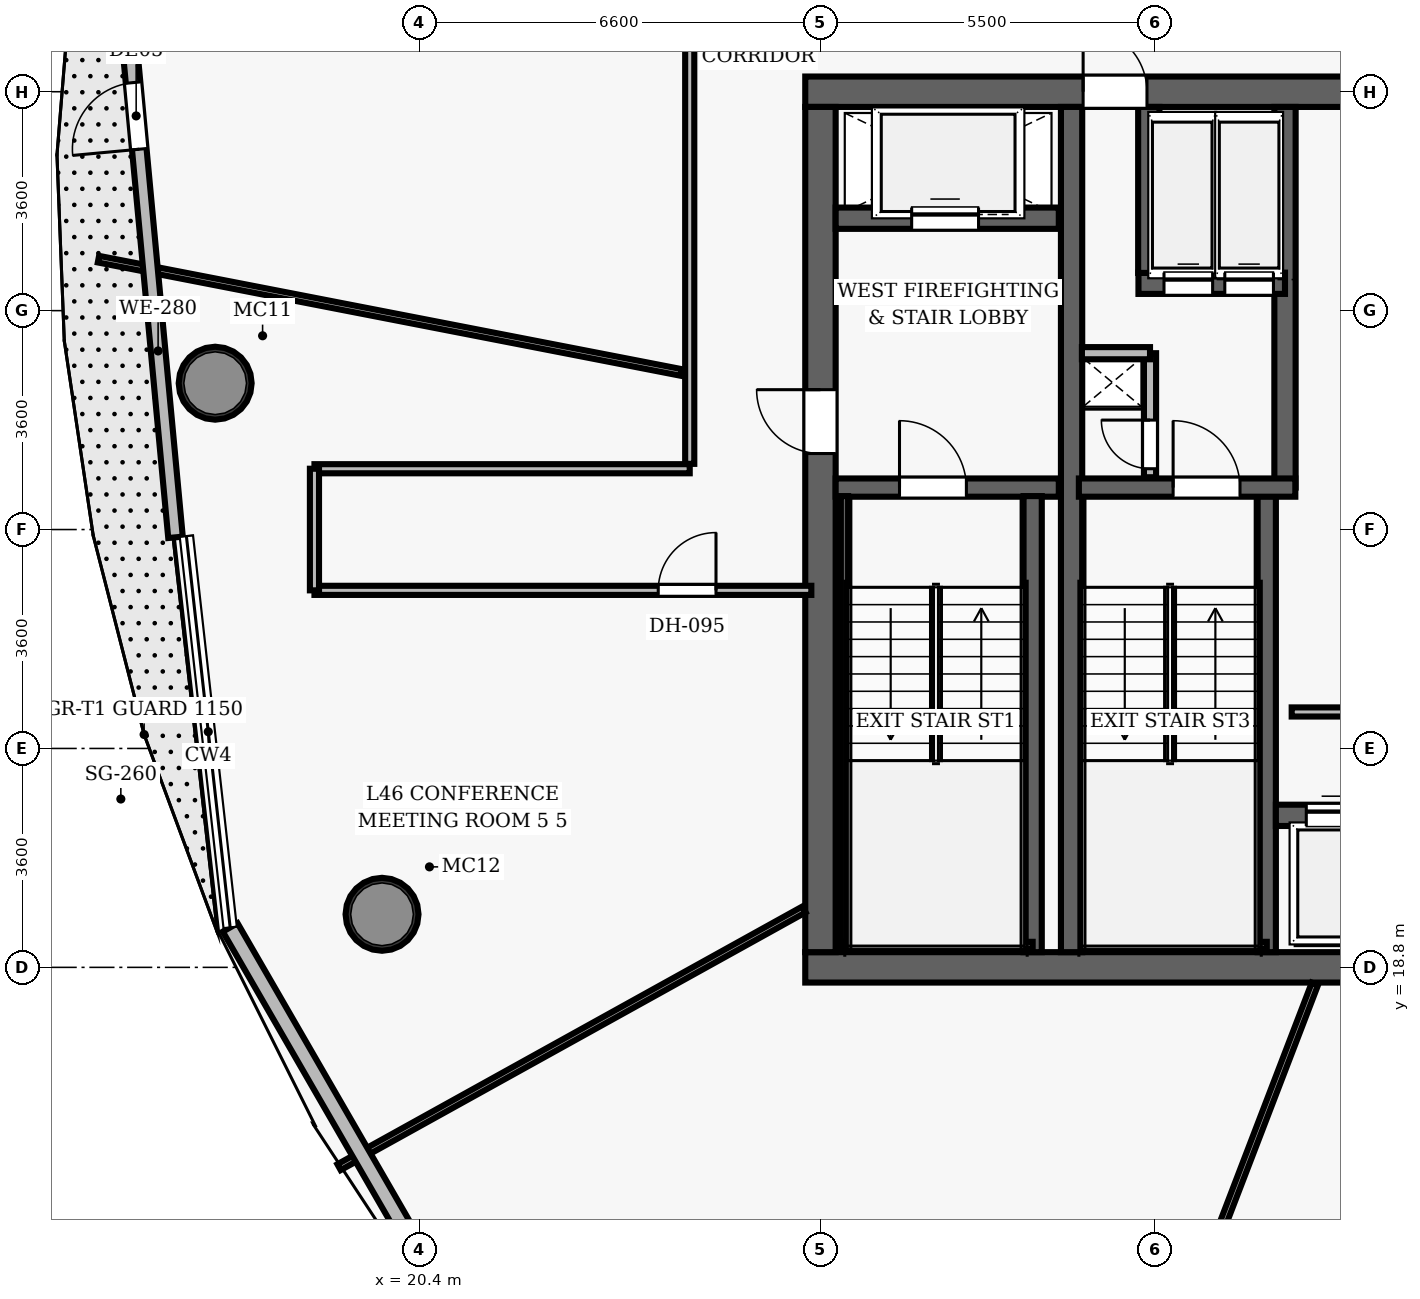
"""IFC4 building model, lengths in metres.
Left out: names, types, materials, properties, quantities, classifications, styles, units other than length and angle.
Written with IfcOpenShell. Run it as: python <this file> out.ifc"""

import sys

from ifc_helpers import new_model, si_unit, direction, frame, frame_2d, origin, origin_2d, place, context, subcontext, project, spatial, rectangle, hollow_circle, extrude, element, fill, save


model = new_model("IFC4")
c1 = context("Model", 3, precision=1e-05, world=origin(), true_north=direction((0.0, 1.0)))
c2 = subcontext(c1, "Body", "Model", "MODEL_VIEW")
j1 = project(units=[si_unit("LENGTHUNIT", "METRE"), si_unit("PLANEANGLEUNIT", "RADIAN")], contexts=[c1])
p1 = place(None, origin())
s1 = spatial("IfcSite", under=j1, at=p1, CompositionType="ELEMENT")
p2 = place(p1, origin())
s2 = spatial("IfcBuilding", under=s1, at=p2, CompositionType="ELEMENT")
p3 = place(p2, frame((0.0, 0.0, 182.75)))
s3 = spatial("IfcBuildingStorey", under=s2, at=p3, CompositionType="ELEMENT", Elevation=182.75)
p4 = place(p3, frame((26.75, 18.8, 0.0), z_axis=(0.0, 0.0, 1.0), x_axis=(1.0, 0.0, 0.0)))
e1 = element("IfcWall", 1, at=p4, inside=s3, PredefinedType="SHEAR", context=c2, shape_type="SweptSolid", body=[
    extrude(rectangle(XDim=22.5, YDim=0.5, at=frame_2d((11.25, 0.0))), origin(), (0.0, 0.0, 1.0), 3.85),
])
p5 = place(p4, frame((14.47, 0.0, 0.0)))
e2 = element("IfcOpeningElement", 2, at=p5, cuts=e1, PredefinedType="OPENING", context=c2, shape_type="SweptSolid", body=[
    extrude(rectangle(XDim=1.05, YDim=2.15, at=frame_2d((0.525, 1.075))), frame((0.0, 0.26, 0.0), z_axis=(0.0, -1.0, 0.0), x_axis=(1.0, 0.0, 0.0)), (0.0, 0.0, 1.0), 0.52),
])
p6 = place(p3, frame((26.75, 33.2, 0.0), z_axis=(0.0, 0.0, 1.0), x_axis=(1.0, 0.0, 0.0)))
e3 = element("IfcWall", 3, at=p6, inside=s3, PredefinedType="SHEAR", context=c2, shape_type="SweptSolid", body=[
    extrude(rectangle(XDim=22.5, YDim=0.5, at=frame_2d((11.25, 0.0))), origin(), (0.0, 0.0, 1.0), 3.85),
])
p7 = place(p6, frame((4.57, 0.0, 0.0)))
e4 = element("IfcOpeningElement", 4, at=p7, cuts=e3, PredefinedType="OPENING", context=c2, shape_type="SweptSolid", body=[
    extrude(rectangle(XDim=1.05, YDim=2.15, at=frame_2d((0.525, 1.075))), frame((0.0, 0.26, 0.0), z_axis=(0.0, -1.0, 0.0), x_axis=(1.0, 0.0, 0.0)), (0.0, 0.0, 1.0), 0.52),
])
p8 = place(p6, frame((14.47, 0.0, 0.0)))
e5 = element("IfcOpeningElement", 5, at=p8, cuts=e3, PredefinedType="OPENING", context=c2, shape_type="SweptSolid", body=[
    extrude(rectangle(XDim=1.05, YDim=2.15, at=frame_2d((0.525, 1.075))), frame((0.0, 0.26, 0.0), z_axis=(0.0, -1.0, 0.0), x_axis=(1.0, 0.0, 0.0)), (0.0, 0.0, 1.0), 0.52),
])
p9 = place(p3, frame((27.0, 19.05, 0.0), z_axis=(0.0, 0.0, 1.0), x_axis=(0.0, 1.0, 0.0)))
e6 = element("IfcWall", 6, at=p9, inside=s3, PredefinedType="SHEAR", context=c2, shape_type="SweptSolid", body=[
    extrude(rectangle(XDim=13.9, YDim=0.5, at=frame_2d((6.95, 0.0))), origin(), (0.0, 0.0, 1.0), 3.85),
])
p10 = place(p9, frame((8.2, 0.0, 0.0)))
e7 = element("IfcOpeningElement", 7, at=p10, cuts=e6, PredefinedType="OPENING", context=c2, shape_type="SweptSolid", body=[
    extrude(rectangle(XDim=1.05, YDim=2.15, at=frame_2d((0.525, 1.075))), frame((0.0, 0.26, 0.0), z_axis=(0.0, -1.0, 0.0), x_axis=(1.0, 0.0, 0.0)), (0.0, 0.0, 1.0), 0.52),
])
p11 = place(p3, frame((31.13, 19.05, 0.0), z_axis=(0.0, 0.0, 1.0), x_axis=(0.0, 1.0, 0.0)))
e8 = element("IfcWall", 8, at=p11, inside=s3, PredefinedType="SHEAR", context=c2, shape_type="SweptSolid", body=[
    extrude(rectangle(XDim=13.9, YDim=0.35, at=frame_2d((6.95, 0.0))), origin(), (0.0, 0.0, 1.0), 3.85),
])
for number, where, z_axis, x_axis in (
    (9, (17.045, 28.406, 0.0), (0.0, 0.0, 1.0), (1.0, 0.0, 0.0)),
    (10, (19.79, 19.673, 0.0), (0.0, 0.0, 1.0), (1.0, 0.0, 0.0)),
):
    element("IfcColumn", number, at=place(p3, frame(where, z_axis=z_axis, x_axis=x_axis)), inside=s3, PredefinedType="COLUMN", context=c2, shape_type="SweptSolid", body=[
        extrude(hollow_circle(Radius=0.6, WallThickness=0.05, at=origin_2d()), origin(), (0.0, 0.0, 1.0), 3.85),
    ])
p12 = place(p3, frame((27.25, 26.69, 0.0), z_axis=(0.0, 0.0, 1.0), x_axis=(1.0, 0.0, 0.0)))
e11 = element("IfcWall", 11, at=p12, inside=s3, PredefinedType="SHEAR", context=c2, shape_type="SweptSolid", body=[
    extrude(rectangle(XDim=3.67, YDim=0.3, at=frame_2d((1.835, 0.0))), origin(), (0.0, 0.0, 1.0), 3.85),
])
p13 = place(p12, frame((1.05, 0.0, 0.0)))
e12 = element("IfcOpeningElement", 12, at=p13, cuts=e11, PredefinedType="OPENING", context=c2, shape_type="SweptSolid", body=[
    extrude(rectangle(XDim=1.1, YDim=2.15, at=frame_2d((0.55, 1.075))), frame((0.0, 0.16, 0.0), z_axis=(0.0, -1.0, 0.0), x_axis=(1.0, 0.0, 0.0)), (0.0, 0.0, 1.0), 0.32),
])
p14 = place(p3, frame((30.49, 19.05, 0.0), z_axis=(0.0, 0.0, 1.0), x_axis=(0.0, 1.0, 0.0)))
e13 = element("IfcWall", 13, at=p14, inside=s3, PredefinedType="SHEAR", context=c2, shape_type="SweptSolid", body=[
    extrude(rectangle(XDim=7.5, YDim=0.3, at=frame_2d((3.75, 0.0))), origin(), (0.0, 0.0, 1.0), 3.85),
])
p15 = place(p3, frame((27.395, 19.1, 0.0), z_axis=(0.0, 0.0, 1.0), x_axis=(0.0, 1.0, 0.0)))
e14 = element("IfcWall", 14, at=p15, inside=s3, PredefinedType="SHEAR", context=c2, shape_type="SweptSolid", body=[
    extrude(rectangle(XDim=7.45, YDim=0.12, at=frame_2d((3.725, 0.0))), origin(), (0.0, 0.0, 1.0), 3.85),
])
p16 = place(p3, frame((27.395, 19.16, 0.0), z_axis=(0.0, 0.0, 1.0), x_axis=(1.0, 0.0, 0.0)))
e15 = element("IfcWall", 15, at=p16, inside=s3, PredefinedType="SHEAR", context=c2, shape_type="SweptSolid", body=[
    extrude(rectangle(XDim=3.095, YDim=0.12, at=frame_2d((1.547, 0.0))), origin(), (0.0, 0.0, 1.0), 3.85),
])
p17 = place(p3, frame((27.25, 31.12, 0.0), z_axis=(0.0, 0.0, 1.0), x_axis=(1.0, 0.0, 0.0)))
e16 = element("IfcWall", 16, at=p17, inside=s3, PredefinedType="SHEAR", context=c2, shape_type="SweptSolid", body=[
    extrude(rectangle(XDim=3.67, YDim=0.35, at=frame_2d((1.835, 0.0))), origin(), (0.0, 0.0, 1.0), 3.035),
])
p18 = place(p17, frame((1.25, 0.0, 0.0)))
e17 = element("IfcOpeningElement", 17, at=p18, cuts=e16, PredefinedType="OPENING", context=c2, shape_type="SweptSolid", body=[
    extrude(rectangle(XDim=1.1, YDim=2.15, at=frame_2d((0.55, 1.075))), frame((0.0, 0.185, 0.0), z_axis=(0.0, -1.0, 0.0), x_axis=(1.0, 0.0, 0.0)), (0.0, 0.0, 1.0), 0.37),
])
p19 = place(p3, frame((34.34, 19.05, 0.0), z_axis=(0.0, 0.0, 1.0), x_axis=(0.0, 1.0, 0.0)))
e18 = element("IfcWall", 18, at=p19, inside=s3, PredefinedType="SHEAR", context=c2, shape_type="SweptSolid", body=[
    extrude(rectangle(XDim=7.5, YDim=0.3, at=frame_2d((3.75, 0.0))), origin(), (0.0, 0.0, 1.0), 3.85),
])
p20 = place(p3, frame((34.64, 26.69, 0.0), z_axis=(0.0, 0.0, 1.0), x_axis=(0.0, 1.0, 0.0)))
e19 = element("IfcWall", 19, at=p20, inside=s3, PredefinedType="SHEAR", context=c2, shape_type="SweptSolid", body=[
    extrude(rectangle(XDim=6.26, YDim=0.35, at=frame_2d((3.13, 0.0))), origin(), (0.0, 0.0, 1.0), 3.85),
])
p21 = place(p3, frame((31.25, 26.69, 0.0), z_axis=(0.0, 0.0, 1.0), x_axis=(1.0, 0.0, 0.0)))
e20 = element("IfcWall", 20, at=p21, inside=s3, PredefinedType="SHEAR", context=c2, shape_type="SweptSolid", body=[
    extrude(rectangle(XDim=3.56, YDim=0.3, at=frame_2d((1.78, 0.0))), origin(), (0.0, 0.0, 1.0), 3.85),
])
p22 = place(p21, frame((1.55, 0.0, 0.0)))
e21 = element("IfcOpeningElement", 21, at=p22, cuts=e20, PredefinedType="OPENING", context=c2, shape_type="SweptSolid", body=[
    extrude(rectangle(XDim=1.1, YDim=2.15, at=frame_2d((0.55, 1.075))), frame((0.0, 0.16, 0.0), z_axis=(0.0, -1.0, 0.0), x_axis=(1.0, 0.0, 0.0)), (0.0, 0.0, 1.0), 0.32),
])
p23 = place(p3, frame((31.3, 19.16, 0.0), z_axis=(0.0, 0.0, 1.0), x_axis=(1.0, 0.0, 0.0)))
e22 = element("IfcWall", 22, at=p23, inside=s3, PredefinedType="SHEAR", context=c2, shape_type="SweptSolid", body=[
    extrude(rectangle(XDim=3.04, YDim=0.12, at=frame_2d((1.52, 0.0))), origin(), (0.0, 0.0, 1.0), 3.85),
])
p24 = place(p3, frame((32.23, 30.05, 0.0), z_axis=(0.0, 0.0, 1.0), x_axis=(1.0, 0.0, 0.0)))
e23 = element("IfcWall", 23, at=p24, inside=s3, PredefinedType="SHEAR", context=c2, shape_type="SweptSolid", body=[
    extrude(rectangle(XDim=2.41, YDim=0.35, at=frame_2d((1.205, 0.0))), origin(), (0.0, 0.0, 1.0), 3.035),
])
p25 = place(p24, frame((0.42, 0.0, 0.0)))
e24 = element("IfcOpeningElement", 24, at=p25, cuts=e23, PredefinedType="OPENING", context=c2, shape_type="SweptSolid", body=[
    extrude(rectangle(XDim=0.8, YDim=2.15, at=frame_2d((0.4, 1.075))), frame((0.0, 0.185, 0.0), z_axis=(0.0, -1.0, 0.0), x_axis=(1.0, 0.0, 0.0)), (0.0, 0.0, 1.0), 0.37),
])
p26 = place(p24, frame((1.42, 0.0, 0.0)))
e25 = element("IfcOpeningElement", 25, at=p26, cuts=e23, PredefinedType="OPENING", context=c2, shape_type="SweptSolid", body=[
    extrude(rectangle(XDim=0.8, YDim=2.15, at=frame_2d((0.4, 1.075))), frame((0.0, 0.185, 0.0), z_axis=(0.0, -1.0, 0.0), x_axis=(1.0, 0.0, 0.0)), (0.0, 0.0, 1.0), 0.37),
])
p27 = place(p3, frame((32.4, 30.22, 0.0), z_axis=(0.0, 0.0, 1.0), x_axis=(0.0, 1.0, 0.0)))
e26 = element("IfcWall", 26, at=p27, inside=s3, PredefinedType="SHEAR", context=c2, shape_type="SweptSolid", body=[
    extrude(rectangle(XDim=2.73, YDim=0.35, at=frame_2d((1.365, 0.0))), origin(), (0.0, 0.0, 1.0), 3.035),
])
p28 = place(p3, frame((32.42, 26.86, 0.0), z_axis=(0.0, 0.0, 1.0), x_axis=(0.0, 1.0, 0.0)))
e27 = element("IfcWall", 27, at=p28, inside=s3, PredefinedType="PARTITIONING", context=c2, shape_type="SweptSolid", body=[
    extrude(rectangle(XDim=2.04, YDim=0.2, at=frame_2d((1.02, 0.0))), origin(), (0.0, 0.0, 1.0), 3.035),
])
p29 = place(p28, frame((0.14, 0.0, 0.0)))
e28 = element("IfcOpeningElement", 28, at=p29, cuts=e27, PredefinedType="OPENING", context=c2, shape_type="SweptSolid", body=[
    extrude(rectangle(XDim=0.8, YDim=2.05, at=frame_2d((0.4, 1.025))), frame((0.0, 0.11, 0.0), z_axis=(0.0, -1.0, 0.0), x_axis=(1.0, 0.0, 0.0)), (0.0, 0.0, 1.0), 0.22),
])
p30 = place(p3, frame((31.3, 28.9, 0.0), z_axis=(0.0, 0.0, 1.0), x_axis=(1.0, 0.0, 0.0)))
e29 = element("IfcWall", 29, at=p30, inside=s3, PredefinedType="PARTITIONING", context=c2, shape_type="SweptSolid", body=[
    extrude(rectangle(XDim=1.12, YDim=0.2, at=frame_2d((0.56, 0.0))), origin(), (0.0, 0.0, 1.0), 3.035),
])
p31 = place(p3, frame((34.49, 21.3, 0.0), z_axis=(0.0, 0.0, 1.0), x_axis=(1.0, 0.0, 0.0)))
e30 = element("IfcWall", 30, at=p31, inside=s3, PredefinedType="SHEAR", context=c2, shape_type="SweptSolid", body=[
    extrude(rectangle(XDim=6.68, YDim=0.35, at=frame_2d((3.34, 0.0))), origin(), (0.0, 0.0, 1.0), 3.035),
])
p32 = place(p31, frame((0.5, 0.0, 0.0)))
e31 = element("IfcOpeningElement", 31, at=p32, cuts=e30, PredefinedType="OPENING", context=c2, shape_type="SweptSolid", body=[
    extrude(rectangle(XDim=0.9, YDim=2.15, at=frame_2d((0.45, 1.075))), frame((0.0, 0.185, 0.0), z_axis=(0.0, -1.0, 0.0), x_axis=(1.0, 0.0, 0.0)), (0.0, 0.0, 1.0), 0.37),
])
p33 = place(p31, frame((2.58, 0.0, 0.0)))
e32 = element("IfcOpeningElement", 32, at=p33, cuts=e30, PredefinedType="OPENING", context=c2, shape_type="SweptSolid", body=[
    extrude(rectangle(XDim=0.9, YDim=2.15, at=frame_2d((0.45, 1.075))), frame((0.0, 0.185, 0.0), z_axis=(0.0, -1.0, 0.0), x_axis=(1.0, 0.0, 0.0)), (0.0, 0.0, 1.0), 0.37),
])
p34 = place(p31, frame((4.66, 0.0, 0.0)))
e33 = element("IfcOpeningElement", 33, at=p34, cuts=e30, PredefinedType="OPENING", context=c2, shape_type="SweptSolid", body=[
    extrude(rectangle(XDim=0.9, YDim=2.15, at=frame_2d((0.45, 1.075))), frame((0.0, 0.185, 0.0), z_axis=(0.0, -1.0, 0.0), x_axis=(1.0, 0.0, 0.0)), (0.0, 0.0, 1.0), 0.37),
])
p35 = place(p3, frame((34.75, 23.0, 0.0), z_axis=(0.0, 0.0, 1.0), x_axis=(1.0, 0.0, 0.0)))
e34 = element("IfcWall", 34, at=p35, inside=s3, PredefinedType="PARTITIONING", context=c2, shape_type="SweptSolid", body=[
    extrude(rectangle(XDim=6.25, YDim=0.15, at=frame_2d((3.125, 0.0))), origin(), (0.0, 0.0, 1.0), 3.035),
])
p36 = place(p3, frame((24.85, 27.08, 0.0), z_axis=(0.0, 0.0, 1.0), x_axis=(0.0, 1.0, 0.0)))
e35 = element("IfcWall", 35, at=p36, inside=s3, PredefinedType="PARTITIONING", context=c2, shape_type="SweptSolid", body=[
    extrude(rectangle(XDim=8.12, YDim=0.15, at=frame_2d((4.06, 0.0))), origin(), (0.0, 0.0, 1.0), 3.035),
])
p37 = place(p3, frame((18.678, 27.0, 0.0), z_axis=(0.0, 0.0, 1.0), x_axis=(1.0, 0.0, 0.0)))
e36 = element("IfcWall", 36, at=p37, inside=s3, PredefinedType="PARTITIONING", context=c2, shape_type="SweptSolid", body=[
    extrude(rectangle(XDim=6.172, YDim=0.15, at=frame_2d((3.086, 0.0))), origin(), (0.0, 0.0, 1.0), 3.035),
])
p38 = place(p3, frame((18.678, 25.0, 0.0), z_axis=(0.0, 0.0, 1.0), x_axis=(1.0, 0.0, 0.0)))
e37 = element("IfcWall", 37, at=p38, inside=s3, PredefinedType="PARTITIONING", context=c2, shape_type="SweptSolid", body=[
    extrude(rectangle(XDim=8.172, YDim=0.15, at=frame_2d((4.086, 0.0))), origin(), (0.0, 0.0, 1.0), 3.035),
])
p39 = place(p38, frame((5.654, 0.0, 0.0)))
e38 = element("IfcOpeningElement", 38, at=p39, cuts=e37, PredefinedType="OPENING", context=c2, shape_type="SweptSolid", body=[
    extrude(rectangle(XDim=0.95, YDim=2.15, at=frame_2d((0.475, 1.075))), frame((0.0, 0.085, 0.0), z_axis=(0.0, -1.0, 0.0), x_axis=(1.0, 0.0, 0.0)), (0.0, 0.0, 1.0), 0.17),
])
p40 = place(p3, frame((18.678, 25.0, 0.0), z_axis=(0.0, 0.0, 1.0), x_axis=(0.0, 1.0, 0.0)))
e39 = element("IfcWall", 39, at=p40, inside=s3, PredefinedType="PARTITIONING", context=c2, shape_type="SweptSolid", body=[
    extrude(rectangle(XDim=2.0, YDim=0.15, at=frame_2d((1.0, 0.0))), origin(), (0.0, 0.0, 1.0), 3.035),
])
p41 = place(p3, frame((24.71, 28.583, 0.0), z_axis=(0.0, 0.0, 1.0), x_axis=(-0.981627099971, 0.190809424827, 0.0)))
e40 = element("IfcWall", 40, at=p41, inside=s3, PredefinedType="PARTITIONING", context=c2, shape_type="SweptSolid", body=[
    extrude(rectangle(XDim=9.764, YDim=0.11, at=frame_2d((4.882, 0.0))), origin(), (0.0, 0.0, 1.0), 3.035),
])
p42 = place(p3, frame((26.73, 19.753, 0.0), z_axis=(0.0, 0.0, 1.0), x_axis=(-0.8746217995, -0.484805845509, 0.0)))
e41 = element("IfcWall", 41, at=p42, inside=s3, PredefinedType="PARTITIONING", context=c2, shape_type="SweptSolid", body=[
    extrude(rectangle(XDim=8.744, YDim=0.11, at=frame_2d((4.372, 0.0))), origin(), (0.0, 0.0, 1.0), 3.035),
])
p43 = place(p3, frame((35.133, 18.53, 0.0), z_axis=(0.0, 0.0, 1.0), x_axis=(-0.358369457817, -0.933579847525, 0.0)))
e42 = element("IfcWall", 42, at=p43, inside=s3, PredefinedType="PARTITIONING", context=c2, shape_type="SweptSolid", body=[
    extrude(rectangle(XDim=14.118, YDim=0.11, at=frame_2d((7.059, 0.0))), origin(), (0.0, 0.0, 1.0), 3.035),
])
p44 = place(p3, frame((16.393, 25.872, 0.0), z_axis=(0.0, 0.0, 1.0), x_axis=(-0.092960122744, 0.995669832615, 0.0)))
e43 = element("IfcWall", 43, at=p44, inside=s3, PredefinedType="SOLIDWALL", context=c2, shape_type="SweptSolid", body=[
    extrude(rectangle(XDim=11.784, YDim=0.24, at=frame_2d((5.892, 0.0))), origin(), (0.0, 0.0, 1.0), 2.8),
])
p45 = place(p44, frame((6.41, 0.0, 0.0)))
e44 = element("IfcOpeningElement", 44, at=p45, cuts=e43, PredefinedType="OPENING", context=c2, shape_type="SweptSolid", body=[
    extrude(rectangle(XDim=1.1, YDim=2.2, at=frame_2d((0.55, 1.1))), frame((0.0, 0.13, 0.0), z_axis=(0.0, -1.0, 0.0), x_axis=(1.0, 0.0, 0.0)), (0.0, 0.0, 1.0), 0.26),
])
p46 = place(p3, frame((20.802, 13.38, 0.0), z_axis=(0.0, 0.0, 1.0), x_axis=(-0.500135006621, 0.865947443643, 0.0)))
e45 = element("IfcWall", 45, at=p46, inside=s3, PredefinedType="SOLIDWALL", context=c2, shape_type="SweptSolid", body=[
    extrude(rectangle(XDim=7.018, YDim=0.28, at=frame_2d((3.509, 0.0))), origin(), (0.0, 0.0, 1.0), 3.62),
])
p47 = place(p13, origin())
e46 = element("IfcDoor", 46, at=p47, inside=s3, OperationType="SINGLE_SWING_LEFT", PredefinedType="DOOR", context=c2, shape_type="SweptSolid", body=[
    extrude(rectangle(XDim=1.1, YDim=2.15, at=frame_2d((0.55, 1.075))), frame((0.0, 0.025, 0.0), z_axis=(0.0, -1.0, 0.0), x_axis=(1.0, 0.0, 0.0)), (0.0, 0.0, 1.0), 0.05),
])
fill(e12, e46)
p48 = place(p10, origin())
e47 = element("IfcDoor", 47, at=p48, inside=s3, OperationType="SINGLE_SWING_RIGHT", PredefinedType="DOOR", context=c2, shape_type="SweptSolid", body=[
    extrude(rectangle(XDim=1.05, YDim=2.15, at=frame_2d((0.525, 1.075))), frame((0.0, 0.025, 0.0), z_axis=(0.0, -1.0, 0.0), x_axis=(1.0, 0.0, 0.0)), (0.0, 0.0, 1.0), 0.05),
])
fill(e7, e47)
p49 = place(p22, origin())
e48 = element("IfcDoor", 48, at=p49, inside=s3, OperationType="SINGLE_SWING_LEFT", PredefinedType="DOOR", context=c2, shape_type="SweptSolid", body=[
    extrude(rectangle(XDim=1.1, YDim=2.15, at=frame_2d((0.55, 1.075))), frame((0.0, 0.025, 0.0), z_axis=(0.0, -1.0, 0.0), x_axis=(1.0, 0.0, 0.0)), (0.0, 0.0, 1.0), 0.05),
])
fill(e21, e48)
p50 = place(p29, origin())
e49 = element("IfcDoor", 49, at=p50, inside=s3, OperationType="SINGLE_SWING_RIGHT", PredefinedType="DOOR", context=c2, shape_type="SweptSolid", body=[
    extrude(rectangle(XDim=0.8, YDim=2.05, at=frame_2d((0.4, 1.025))), frame((0.0, 0.025, 0.0), z_axis=(0.0, -1.0, 0.0), x_axis=(1.0, 0.0, 0.0)), (0.0, 0.0, 1.0), 0.05),
])
fill(e28, e49)
p51 = place(p7, origin())
e50 = element("IfcDoor", 50, at=p51, inside=s3, OperationType="SINGLE_SWING_LEFT", PredefinedType="DOOR", context=c2, shape_type="SweptSolid", body=[
    extrude(rectangle(XDim=1.05, YDim=2.15, at=frame_2d((0.525, 1.075))), frame((0.0, 0.025, 0.0), z_axis=(0.0, -1.0, 0.0), x_axis=(1.0, 0.0, 0.0)), (0.0, 0.0, 1.0), 0.05),
])
fill(e4, e50)
p52 = place(p39, origin())
e51 = element("IfcDoor", 51, at=p52, inside=s3, OperationType="SINGLE_SWING_RIGHT", PredefinedType="DOOR", context=c2, shape_type="SweptSolid", body=[
    extrude(rectangle(XDim=0.95, YDim=2.15, at=frame_2d((0.475, 1.075))), frame((0.0, 0.025, 0.0), z_axis=(0.0, -1.0, 0.0), x_axis=(1.0, 0.0, 0.0)), (0.0, 0.0, 1.0), 0.05),
])
fill(e38, e51)
p53 = place(p32, origin())
e52 = element("IfcDoor", 52, at=p53, inside=s3, OperationType="SLIDING_TO_LEFT", PredefinedType="DOOR", context=c2, shape_type="SweptSolid", body=[
    extrude(rectangle(XDim=0.9, YDim=2.15, at=frame_2d((0.45, 1.075))), frame((0.0, 0.025, 0.0), z_axis=(0.0, -1.0, 0.0), x_axis=(1.0, 0.0, 0.0)), (0.0, 0.0, 1.0), 0.05),
])
fill(e31, e52)
p54 = place(p18, origin())
e53 = element("IfcDoor", 53, at=p54, inside=s3, OperationType="SLIDING_TO_LEFT", PredefinedType="DOOR", context=c2, shape_type="SweptSolid", body=[
    extrude(rectangle(XDim=1.1, YDim=2.15, at=frame_2d((0.55, 1.075))), frame((0.0, 0.025, 0.0), z_axis=(0.0, -1.0, 0.0), x_axis=(1.0, 0.0, 0.0)), (0.0, 0.0, 1.0), 0.05),
])
fill(e17, e53)
p55 = place(p25, origin())
e54 = element("IfcDoor", 54, at=p55, inside=s3, OperationType="SLIDING_TO_LEFT", PredefinedType="DOOR", context=c2, shape_type="SweptSolid", body=[
    extrude(rectangle(XDim=0.8, YDim=2.15, at=frame_2d((0.4, 1.075))), frame((0.0, 0.025, 0.0), z_axis=(0.0, -1.0, 0.0), x_axis=(1.0, 0.0, 0.0)), (0.0, 0.0, 1.0), 0.05),
])
fill(e24, e54)
p56 = place(p26, origin())
e55 = element("IfcDoor", 55, at=p56, inside=s3, OperationType="SLIDING_TO_LEFT", PredefinedType="DOOR", context=c2, shape_type="SweptSolid", body=[
    extrude(rectangle(XDim=0.8, YDim=2.15, at=frame_2d((0.4, 1.075))), frame((0.0, 0.025, 0.0), z_axis=(0.0, -1.0, 0.0), x_axis=(1.0, 0.0, 0.0)), (0.0, 0.0, 1.0), 0.05),
])
fill(e25, e55)
p57 = place(p45, origin())
e56 = element("IfcDoor", 56, at=p57, inside=s3, OperationType="SINGLE_SWING_LEFT", PredefinedType="DOOR", context=c2, shape_type="SweptSolid", body=[
    extrude(rectangle(XDim=1.1, YDim=2.2, at=frame_2d((0.55, 1.1))), frame((0.0, 0.025, 0.0), z_axis=(0.0, -1.0, 0.0), x_axis=(1.0, 0.0, 0.0)), (0.0, 0.0, 1.0), 0.05),
])
fill(e44, e56)
save(model, sys.argv[1])
